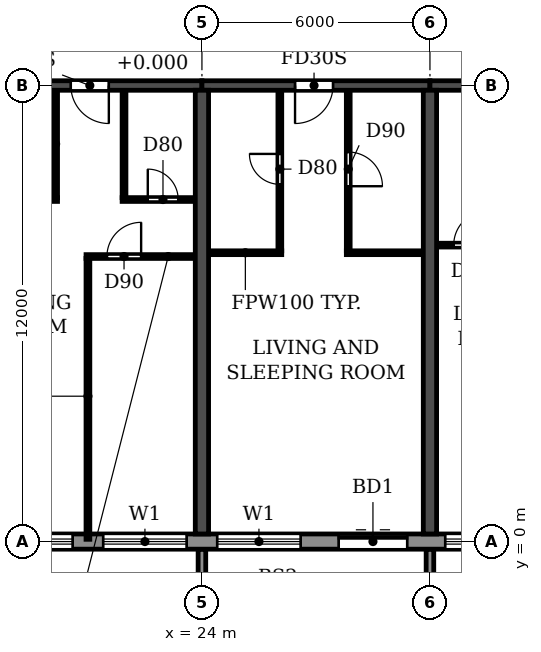
"""IFC4 building model, lengths in metres.
Left out: names, types, materials, properties, quantities, classifications, styles, units other than length and angle.
Written with IfcOpenShell. Run it as: python <this file> out.ifc"""

import sys

from ifc_helpers import new_model, si_unit, direction, frame, frame_2d, origin, place, context, subcontext, project, spatial, polyline, rectangle, outline, extrude, source, transform, mapped, element, fill, save


model = new_model("IFC4")
c1 = context("Model", 3, precision=1e-05, world=origin(), true_north=direction((0.0, 1.0)))
c2 = subcontext(c1, "Body", "Model", "MODEL_VIEW")
j1 = project(units=[si_unit("LENGTHUNIT", "METRE"), si_unit("PLANEANGLEUNIT", "RADIAN")], contexts=[c1])
p1 = place(None, origin())
s1 = spatial("IfcSite", under=j1, at=p1, CompositionType="ELEMENT")
p2 = place(p1, origin())
s2 = spatial("IfcBuilding", under=s1, at=p2, CompositionType="ELEMENT")
p3 = place(p2, frame((0.0, 0.0, 109.2)))
s3 = spatial("IfcBuildingStorey", under=s2, at=p3, CompositionType="ELEMENT", Elevation=109.2)
for number, where, z_axis, x_axis in (
    (1, (24.0, 0.2, 0.0), (0.0, 0.0, 1.0), (0.0, 1.0, 0.0)),
    (2, (30.0, 0.2, 0.0), (0.0, 0.0, 1.0), (0.0, 1.0, 0.0)),
):
    element("IfcWall", number, at=place(p3, frame(where, z_axis=z_axis, x_axis=x_axis)), inside=s3, PredefinedType="SHEAR", context=c2, shape_type="SweptSolid", body=[
        extrude(rectangle(XDim=11.675, YDim=0.35, at=frame_2d((5.837, 0.0))), origin(), (0.0, 0.0, 1.0), 3.06),
    ])
p4 = place(p3, frame((18.0, 12.0, 0.0), z_axis=(0.0, 0.0, 1.0), x_axis=(1.0, 0.0, 0.0)))
e3 = element("IfcWall", 3, at=p4, inside=s3, PredefinedType="SHEAR", context=c2, shape_type="SweptSolid", body=[
    extrude(rectangle(XDim=6.0, YDim=0.25, at=frame_2d((3.0, 0.0))), origin(), (0.0, 0.0, 1.0), 2.46),
])
p5 = place(p4, frame((2.55, 0.0, 0.0)))
e4 = element("IfcOpeningElement", 4, at=p5, cuts=e3, PredefinedType="OPENING", context=c2, shape_type="SweptSolid", body=[
    extrude(rectangle(XDim=1.0, YDim=2.1, at=frame_2d((0.5, 1.05))), frame((0.0, 0.135, 0.0), z_axis=(0.0, -1.0, 0.0), x_axis=(1.0, 0.0, 0.0)), (0.0, 0.0, 1.0), 0.27),
])
p6 = place(p3, frame((24.0, 12.0, 0.0), z_axis=(0.0, 0.0, 1.0), x_axis=(1.0, 0.0, 0.0)))
e5 = element("IfcWall", 5, at=p6, inside=s3, PredefinedType="SHEAR", context=c2, shape_type="SweptSolid", body=[
    extrude(rectangle(XDim=6.0, YDim=0.25, at=frame_2d((3.0, 0.0))), origin(), (0.0, 0.0, 1.0), 2.46),
])
p7 = place(p6, frame((2.45, 0.0, 0.0)))
e6 = element("IfcOpeningElement", 6, at=p7, cuts=e5, PredefinedType="OPENING", context=c2, shape_type="SweptSolid", body=[
    extrude(rectangle(XDim=1.0, YDim=2.1, at=frame_2d((0.5, 1.05))), frame((0.0, 0.135, 0.0), z_axis=(0.0, -1.0, 0.0), x_axis=(1.0, 0.0, 0.0)), (0.0, 0.0, 1.0), 0.27),
])
p8 = place(p3, frame((30.0, 12.0, 0.0), z_axis=(0.0, 0.0, 1.0), x_axis=(1.0, 0.0, 0.0)))
e7 = element("IfcWall", 7, at=p8, inside=s3, PredefinedType="SHEAR", context=c2, shape_type="SweptSolid", body=[
    extrude(rectangle(XDim=6.0, YDim=0.25, at=frame_2d((3.0, 0.0))), origin(), (0.0, 0.0, 1.0), 2.46),
])
p9 = place(p8, frame((2.55, 0.0, 0.0)))
e8 = element("IfcOpeningElement", 8, at=p9, cuts=e7, PredefinedType="OPENING", context=c2, shape_type="SweptSolid", body=[
    extrude(rectangle(XDim=1.0, YDim=2.1, at=frame_2d((0.5, 1.05))), frame((0.0, 0.135, 0.0), z_axis=(0.0, -1.0, 0.0), x_axis=(1.0, 0.0, 0.0)), (0.0, 0.0, 1.0), 0.27),
])
p10 = place(p3, frame((16.683, 0.0, 0.0), z_axis=(0.0, 0.0, 1.0), x_axis=(1.0, 0.0, 0.0)))
e9 = element("IfcWall", 9, at=p10, inside=s3, PredefinedType="STANDARD", context=c2, shape_type="SweptSolid", body=[
    extrude(rectangle(XDim=68.634, YDim=0.4, at=frame_2d((34.317, 0.0))), origin(), (0.0, 0.0, 1.0), 3.06),
])
p11 = place(p10, frame((1.717, 0.0, 0.9)))
e10 = element("IfcOpeningElement", 10, at=p11, cuts=e9, PredefinedType="OPENING", context=c2, shape_type="SweptSolid", body=[
    extrude(rectangle(XDim=2.2, YDim=1.5, at=frame_2d((1.1, 0.75))), frame((0.0, 0.21, 0.0), z_axis=(0.0, -1.0, 0.0), x_axis=(1.0, 0.0, 0.0)), (0.0, 0.0, 1.0), 0.42),
])
p12 = place(p10, frame((4.717, 0.0, 0.9)))
e11 = element("IfcOpeningElement", 11, at=p12, cuts=e9, PredefinedType="OPENING", context=c2, shape_type="SweptSolid", body=[
    extrude(rectangle(XDim=2.2, YDim=1.5, at=frame_2d((1.1, 0.75))), frame((0.0, 0.21, 0.0), z_axis=(0.0, -1.0, 0.0), x_axis=(1.0, 0.0, 0.0)), (0.0, 0.0, 1.0), 0.42),
])
p13 = place(p10, frame((7.717, 0.0, 0.9)))
e12 = element("IfcOpeningElement", 12, at=p13, cuts=e9, PredefinedType="OPENING", context=c2, shape_type="SweptSolid", body=[
    extrude(rectangle(XDim=2.2, YDim=1.5, at=frame_2d((1.1, 0.75))), frame((0.0, 0.21, 0.0), z_axis=(0.0, -1.0, 0.0), x_axis=(1.0, 0.0, 0.0)), (0.0, 0.0, 1.0), 0.42),
])
p14 = place(p10, frame((10.917, 0.0, 0.0)))
e13 = element("IfcOpeningElement", 13, at=p14, cuts=e9, PredefinedType="OPENING", context=c2, shape_type="SweptSolid", body=[
    extrude(rectangle(XDim=1.8, YDim=2.4, at=frame_2d((0.9, 1.2))), frame((0.0, 0.21, 0.0), z_axis=(0.0, -1.0, 0.0), x_axis=(1.0, 0.0, 0.0)), (0.0, 0.0, 1.0), 0.42),
])
p15 = place(p10, frame((13.717, 0.0, 0.9)))
e14 = element("IfcOpeningElement", 14, at=p15, cuts=e9, PredefinedType="OPENING", context=c2, shape_type="SweptSolid", body=[
    extrude(rectangle(XDim=2.2, YDim=1.5, at=frame_2d((1.1, 0.75))), frame((0.0, 0.21, 0.0), z_axis=(0.0, -1.0, 0.0), x_axis=(1.0, 0.0, 0.0)), (0.0, 0.0, 1.0), 0.42),
])
p16 = place(p10, frame((16.717, 0.0, 0.9)))
e15 = element("IfcOpeningElement", 15, at=p16, cuts=e9, PredefinedType="OPENING", context=c2, shape_type="SweptSolid", body=[
    extrude(rectangle(XDim=2.2, YDim=1.5, at=frame_2d((1.1, 0.75))), frame((0.0, 0.21, 0.0), z_axis=(0.0, -1.0, 0.0), x_axis=(1.0, 0.0, 0.0)), (0.0, 0.0, 1.0), 0.42),
])
p17 = place(p10, frame((19.717, 0.0, 0.9)))
e16 = element("IfcOpeningElement", 16, at=p17, cuts=e9, PredefinedType="OPENING", context=c2, shape_type="SweptSolid", body=[
    extrude(rectangle(XDim=2.2, YDim=1.5, at=frame_2d((1.1, 0.75))), frame((0.0, 0.21, 0.0), z_axis=(0.0, -1.0, 0.0), x_axis=(1.0, 0.0, 0.0)), (0.0, 0.0, 1.0), 0.42),
])
p18 = place(p10, frame((22.717, 0.0, 0.9)))
e17 = element("IfcOpeningElement", 17, at=p18, cuts=e9, PredefinedType="OPENING", context=c2, shape_type="SweptSolid", body=[
    extrude(rectangle(XDim=2.2, YDim=1.5, at=frame_2d((1.1, 0.75))), frame((0.0, 0.21, 0.0), z_axis=(0.0, -1.0, 0.0), x_axis=(1.0, 0.0, 0.0)), (0.0, 0.0, 1.0), 0.42),
])
p19 = place(p10, frame((25.717, 0.0, 0.9)))
e18 = element("IfcOpeningElement", 18, at=p19, cuts=e9, PredefinedType="OPENING", context=c2, shape_type="SweptSolid", body=[
    extrude(rectangle(XDim=2.2, YDim=1.5, at=frame_2d((1.1, 0.75))), frame((0.0, 0.21, 0.0), z_axis=(0.0, -1.0, 0.0), x_axis=(1.0, 0.0, 0.0)), (0.0, 0.0, 1.0), 0.42),
])
p20 = place(p10, frame((28.717, 0.0, 0.9)))
e19 = element("IfcOpeningElement", 19, at=p20, cuts=e9, PredefinedType="OPENING", context=c2, shape_type="SweptSolid", body=[
    extrude(rectangle(XDim=2.2, YDim=1.5, at=frame_2d((1.1, 0.75))), frame((0.0, 0.21, 0.0), z_axis=(0.0, -1.0, 0.0), x_axis=(1.0, 0.0, 0.0)), (0.0, 0.0, 1.0), 0.42),
])
p21 = place(p10, frame((31.917, 0.0, 0.0)))
e20 = element("IfcOpeningElement", 20, at=p21, cuts=e9, PredefinedType="OPENING", context=c2, shape_type="SweptSolid", body=[
    extrude(rectangle(XDim=1.8, YDim=2.4, at=frame_2d((0.9, 1.2))), frame((0.0, 0.21, 0.0), z_axis=(0.0, -1.0, 0.0), x_axis=(1.0, 0.0, 0.0)), (0.0, 0.0, 1.0), 0.42),
])
p22 = place(p10, frame((34.717, 0.0, 0.9)))
e21 = element("IfcOpeningElement", 21, at=p22, cuts=e9, PredefinedType="OPENING", context=c2, shape_type="SweptSolid", body=[
    extrude(rectangle(XDim=2.2, YDim=1.5, at=frame_2d((1.1, 0.75))), frame((0.0, 0.21, 0.0), z_axis=(0.0, -1.0, 0.0), x_axis=(1.0, 0.0, 0.0)), (0.0, 0.0, 1.0), 0.42),
])
p23 = place(p10, frame((37.717, 0.0, 0.9)))
e22 = element("IfcOpeningElement", 22, at=p23, cuts=e9, PredefinedType="OPENING", context=c2, shape_type="SweptSolid", body=[
    extrude(rectangle(XDim=2.2, YDim=1.5, at=frame_2d((1.1, 0.75))), frame((0.0, 0.21, 0.0), z_axis=(0.0, -1.0, 0.0), x_axis=(1.0, 0.0, 0.0)), (0.0, 0.0, 1.0), 0.42),
])
p24 = place(p10, frame((40.717, 0.0, 0.9)))
e23 = element("IfcOpeningElement", 23, at=p24, cuts=e9, PredefinedType="OPENING", context=c2, shape_type="SweptSolid", body=[
    extrude(rectangle(XDim=2.2, YDim=1.5, at=frame_2d((1.1, 0.75))), frame((0.0, 0.21, 0.0), z_axis=(0.0, -1.0, 0.0), x_axis=(1.0, 0.0, 0.0)), (0.0, 0.0, 1.0), 0.42),
])
p25 = place(p10, frame((43.717, 0.0, 0.9)))
e24 = element("IfcOpeningElement", 24, at=p25, cuts=e9, PredefinedType="OPENING", context=c2, shape_type="SweptSolid", body=[
    extrude(rectangle(XDim=2.2, YDim=1.5, at=frame_2d((1.1, 0.75))), frame((0.0, 0.21, 0.0), z_axis=(0.0, -1.0, 0.0), x_axis=(1.0, 0.0, 0.0)), (0.0, 0.0, 1.0), 0.42),
])
p26 = place(p10, frame((46.917, 0.0, 0.0)))
e25 = element("IfcOpeningElement", 25, at=p26, cuts=e9, PredefinedType="OPENING", context=c2, shape_type="SweptSolid", body=[
    extrude(rectangle(XDim=1.8, YDim=2.4, at=frame_2d((0.9, 1.2))), frame((0.0, 0.21, 0.0), z_axis=(0.0, -1.0, 0.0), x_axis=(1.0, 0.0, 0.0)), (0.0, 0.0, 1.0), 0.42),
])
p27 = place(p10, frame((49.717, 0.0, 0.9)))
e26 = element("IfcOpeningElement", 26, at=p27, cuts=e9, PredefinedType="OPENING", context=c2, shape_type="SweptSolid", body=[
    extrude(rectangle(XDim=2.2, YDim=1.5, at=frame_2d((1.1, 0.75))), frame((0.0, 0.21, 0.0), z_axis=(0.0, -1.0, 0.0), x_axis=(1.0, 0.0, 0.0)), (0.0, 0.0, 1.0), 0.42),
])
p28 = place(p10, frame((52.717, 0.0, 0.9)))
e27 = element("IfcOpeningElement", 27, at=p28, cuts=e9, PredefinedType="OPENING", context=c2, shape_type="SweptSolid", body=[
    extrude(rectangle(XDim=2.2, YDim=1.5, at=frame_2d((1.1, 0.75))), frame((0.0, 0.21, 0.0), z_axis=(0.0, -1.0, 0.0), x_axis=(1.0, 0.0, 0.0)), (0.0, 0.0, 1.0), 0.42),
])
p29 = place(p10, frame((55.717, 0.0, 0.9)))
e28 = element("IfcOpeningElement", 28, at=p29, cuts=e9, PredefinedType="OPENING", context=c2, shape_type="SweptSolid", body=[
    extrude(rectangle(XDim=2.2, YDim=1.5, at=frame_2d((1.1, 0.75))), frame((0.0, 0.21, 0.0), z_axis=(0.0, -1.0, 0.0), x_axis=(1.0, 0.0, 0.0)), (0.0, 0.0, 1.0), 0.42),
])
p30 = place(p10, frame((58.717, 0.0, 0.9)))
e29 = element("IfcOpeningElement", 29, at=p30, cuts=e9, PredefinedType="OPENING", context=c2, shape_type="SweptSolid", body=[
    extrude(rectangle(XDim=2.2, YDim=1.5, at=frame_2d((1.1, 0.75))), frame((0.0, 0.21, 0.0), z_axis=(0.0, -1.0, 0.0), x_axis=(1.0, 0.0, 0.0)), (0.0, 0.0, 1.0), 0.42),
])
p31 = place(p10, frame((61.717, 0.0, 0.9)))
e30 = element("IfcOpeningElement", 30, at=p31, cuts=e9, PredefinedType="OPENING", context=c2, shape_type="SweptSolid", body=[
    extrude(rectangle(XDim=2.2, YDim=1.5, at=frame_2d((1.1, 0.75))), frame((0.0, 0.21, 0.0), z_axis=(0.0, -1.0, 0.0), x_axis=(1.0, 0.0, 0.0)), (0.0, 0.0, 1.0), 0.42),
])
p32 = place(p10, frame((64.717, 0.0, 0.9)))
e31 = element("IfcOpeningElement", 31, at=p32, cuts=e9, PredefinedType="OPENING", context=c2, shape_type="SweptSolid", body=[
    extrude(rectangle(XDim=2.2, YDim=1.5, at=frame_2d((1.1, 0.75))), frame((0.0, 0.21, 0.0), z_axis=(0.0, -1.0, 0.0), x_axis=(1.0, 0.0, 0.0)), (0.0, 0.0, 1.0), 0.42),
])
m1 = source(origin(), c2, "Body", "SweptSolid", [
    extrude(outline(polyline([(0.0, 0.0), (0.2, 0.0), (0.2, 1.65), (0.0, 1.65), (0.0, 0.0)])), origin(), (0.0, 0.0, 1.0), 3.1),
])
for number, where in (
    (32, (23.9, -1.85, 0.0)),
    (33, (29.9, -1.85, 0.0)),
):
    element("IfcWall", number, at=place(p3, frame(where)), inside=s3, PredefinedType="STANDARD", context=c2, shape_type="MappedRepresentation", body=[
        mapped(m1, transform((0.0, 0.0, 0.0))),
    ])
p33 = place(p3, frame((20.95, 7.5, 0.0), z_axis=(0.0, 0.0, 1.0), x_axis=(1.0, 0.0, 0.0)))
e34 = element("IfcWall", 34, at=p33, inside=s3, PredefinedType="PARTITIONING", context=c2, shape_type="SweptSolid", body=[
    extrude(rectangle(XDim=2.865, YDim=0.1, at=frame_2d((1.433, 0.0))), origin(), (0.0, 0.0, 1.0), 3.06),
])
p34 = place(p33, frame((0.55, 0.0, 0.0)))
e35 = element("IfcOpeningElement", 35, at=p34, cuts=e34, PredefinedType="OPENING", context=c2, shape_type="SweptSolid", body=[
    extrude(rectangle(XDim=0.9, YDim=2.1, at=frame_2d((0.45, 1.05))), frame((0.0, 0.06, 0.0), z_axis=(0.0, -1.0, 0.0), x_axis=(1.0, 0.0, 0.0)), (0.0, 0.0, 1.0), 0.12),
])
p35 = place(p3, frame((24.185, 7.6, 0.0), z_axis=(0.0, 0.0, 1.0), x_axis=(1.0, 0.0, 0.0)))
e36 = element("IfcWall", 36, at=p35, inside=s3, PredefinedType="PARTITIONING", context=c2, shape_type="SweptSolid", body=[
    extrude(rectangle(XDim=1.915, YDim=0.1, at=frame_2d((0.958, 0.0))), origin(), (0.0, 0.0, 1.0), 3.06),
])
p36 = place(p3, frame((27.8, 7.6, 0.0), z_axis=(0.0, 0.0, 1.0), x_axis=(1.0, 0.0, 0.0)))
e37 = element("IfcWall", 37, at=p36, inside=s3, PredefinedType="PARTITIONING", context=c2, shape_type="SweptSolid", body=[
    extrude(rectangle(XDim=2.015, YDim=0.1, at=frame_2d((1.007, 0.0))), origin(), (0.0, 0.0, 1.0), 3.06),
])
p37 = place(p3, frame((30.185, 7.8, 0.0), z_axis=(0.0, 0.0, 1.0), x_axis=(1.0, 0.0, 0.0)))
e38 = element("IfcWall", 38, at=p37, inside=s3, PredefinedType="PARTITIONING", context=c2, shape_type="SweptSolid", body=[
    extrude(rectangle(XDim=2.015, YDim=0.1, at=frame_2d((1.007, 0.0))), origin(), (0.0, 0.0, 1.0), 3.06),
])
p38 = place(p37, frame((0.44, 0.0, 0.0)))
e39 = element("IfcOpeningElement", 39, at=p38, cuts=e38, PredefinedType="OPENING", context=c2, shape_type="SweptSolid", body=[
    extrude(rectangle(XDim=0.9, YDim=2.1, at=frame_2d((0.45, 1.05))), frame((0.0, 0.06, 0.0), z_axis=(0.0, -1.0, 0.0), x_axis=(1.0, 0.0, 0.0)), (0.0, 0.0, 1.0), 0.12),
])
p39 = place(p3, frame((18.185, 9.0, 0.0), z_axis=(0.0, 0.0, 1.0), x_axis=(1.0, 0.0, 0.0)))
e40 = element("IfcWall", 40, at=p39, inside=s3, PredefinedType="PARTITIONING", context=c2, shape_type="SweptSolid", body=[
    extrude(rectangle(XDim=2.015, YDim=0.1, at=frame_2d((1.007, 0.0))), origin(), (0.0, 0.0, 1.0), 3.06),
])
p40 = place(p39, frame((0.44, 0.0, 0.0)))
e41 = element("IfcOpeningElement", 41, at=p40, cuts=e40, PredefinedType="OPENING", context=c2, shape_type="SweptSolid", body=[
    extrude(rectangle(XDim=0.9, YDim=2.1, at=frame_2d((0.45, 1.05))), frame((0.0, 0.06, 0.0), z_axis=(0.0, -1.0, 0.0), x_axis=(1.0, 0.0, 0.0)), (0.0, 0.0, 1.0), 0.12),
])
p41 = place(p3, frame((21.9, 9.0, 0.0), z_axis=(0.0, 0.0, 1.0), x_axis=(1.0, 0.0, 0.0)))
e42 = element("IfcWall", 42, at=p41, inside=s3, PredefinedType="PARTITIONING", context=c2, shape_type="SweptSolid", body=[
    extrude(rectangle(XDim=1.915, YDim=0.1, at=frame_2d((0.958, 0.0))), origin(), (0.0, 0.0, 1.0), 3.06),
])
p42 = place(p41, frame((0.675, 0.0, 0.0)))
e43 = element("IfcOpeningElement", 43, at=p42, cuts=e42, PredefinedType="OPENING", context=c2, shape_type="SweptSolid", body=[
    extrude(rectangle(XDim=0.8, YDim=2.1, at=frame_2d((0.4, 1.05))), frame((0.0, 0.06, 0.0), z_axis=(0.0, -1.0, 0.0), x_axis=(1.0, 0.0, 0.0)), (0.0, 0.0, 1.0), 0.12),
])
p43 = place(p3, frame((20.15, 9.05, 0.0), z_axis=(0.0, 0.0, 1.0), x_axis=(0.0, 1.0, 0.0)))
e44 = element("IfcWall", 44, at=p43, inside=s3, PredefinedType="PARTITIONING", context=c2, shape_type="SweptSolid", body=[
    extrude(rectangle(XDim=2.815, YDim=0.1, at=frame_2d((1.407, 0.0))), origin(), (0.0, 0.0, 1.0), 3.06),
])
p44 = place(p3, frame((21.0, 0.06, 0.0), z_axis=(0.0, 0.0, 1.0), x_axis=(0.0, 1.0, 0.0)))
e45 = element("IfcWall", 45, at=p44, inside=s3, PredefinedType="PARTITIONING", context=c2, shape_type="SweptSolid", body=[
    extrude(rectangle(XDim=7.39, YDim=0.1, at=frame_2d((3.695, 0.0))), origin(), (0.0, 0.0, 1.0), 3.06),
])
p45 = place(p3, frame((21.95, 9.05, 0.0), z_axis=(0.0, 0.0, 1.0), x_axis=(0.0, 1.0, 0.0)))
e46 = element("IfcWall", 46, at=p45, inside=s3, PredefinedType="PARTITIONING", context=c2, shape_type="SweptSolid", body=[
    extrude(rectangle(XDim=2.815, YDim=0.1, at=frame_2d((1.407, 0.0))), origin(), (0.0, 0.0, 1.0), 3.06),
])
p46 = place(p3, frame((26.05, 7.65, 0.0), z_axis=(0.0, 0.0, 1.0), x_axis=(0.0, 1.0, 0.0)))
e47 = element("IfcWall", 47, at=p46, inside=s3, PredefinedType="PARTITIONING", context=c2, shape_type="SweptSolid", body=[
    extrude(rectangle(XDim=4.215, YDim=0.1, at=frame_2d((2.107, 0.0))), origin(), (0.0, 0.0, 1.0), 3.06),
])
p47 = place(p46, frame((1.75, 0.0, 0.0)))
e48 = element("IfcOpeningElement", 48, at=p47, cuts=e47, PredefinedType="OPENING", context=c2, shape_type="SweptSolid", body=[
    extrude(rectangle(XDim=0.8, YDim=2.1, at=frame_2d((0.4, 1.05))), frame((0.0, 0.06, 0.0), z_axis=(0.0, -1.0, 0.0), x_axis=(1.0, 0.0, 0.0)), (0.0, 0.0, 1.0), 0.12),
])
p48 = place(p3, frame((27.85, 7.65, 0.0), z_axis=(0.0, 0.0, 1.0), x_axis=(0.0, 1.0, 0.0)))
e49 = element("IfcWall", 49, at=p48, inside=s3, PredefinedType="PARTITIONING", context=c2, shape_type="SweptSolid", body=[
    extrude(rectangle(XDim=4.215, YDim=0.1, at=frame_2d((2.107, 0.0))), origin(), (0.0, 0.0, 1.0), 3.06),
])
p49 = place(p48, frame((1.7, 0.0, 0.0)))
e50 = element("IfcOpeningElement", 50, at=p49, cuts=e49, PredefinedType="OPENING", context=c2, shape_type="SweptSolid", body=[
    extrude(rectangle(XDim=0.9, YDim=2.1, at=frame_2d((0.45, 1.05))), frame((0.0, 0.06, 0.0), z_axis=(0.0, -1.0, 0.0), x_axis=(1.0, 0.0, 0.0)), (0.0, 0.0, 1.0), 0.12),
])
p50 = place(p11, origin())
e51 = element("IfcWindow", 51, at=p50, inside=s3, PartitioningType="DOUBLE_PANEL_HORIZONTAL", PredefinedType="WINDOW", context=c2, shape_type="SweptSolid", body=[
    extrude(rectangle(XDim=2.2, YDim=1.5, at=frame_2d((1.1, 0.75))), frame((0.0, 0.03, 0.0), z_axis=(0.0, -1.0, 0.0), x_axis=(1.0, 0.0, 0.0)), (0.0, 0.0, 1.0), 0.06),
])
fill(e10, e51)
p51 = place(p12, origin())
e52 = element("IfcWindow", 52, at=p51, inside=s3, PartitioningType="DOUBLE_PANEL_HORIZONTAL", PredefinedType="WINDOW", context=c2, shape_type="SweptSolid", body=[
    extrude(rectangle(XDim=2.2, YDim=1.5, at=frame_2d((1.1, 0.75))), frame((0.0, 0.03, 0.0), z_axis=(0.0, -1.0, 0.0), x_axis=(1.0, 0.0, 0.0)), (0.0, 0.0, 1.0), 0.06),
])
fill(e11, e52)
p52 = place(p13, origin())
e53 = element("IfcWindow", 53, at=p52, inside=s3, PartitioningType="DOUBLE_PANEL_HORIZONTAL", PredefinedType="WINDOW", context=c2, shape_type="SweptSolid", body=[
    extrude(rectangle(XDim=2.2, YDim=1.5, at=frame_2d((1.1, 0.75))), frame((0.0, 0.03, 0.0), z_axis=(0.0, -1.0, 0.0), x_axis=(1.0, 0.0, 0.0)), (0.0, 0.0, 1.0), 0.06),
])
fill(e12, e53)
p53 = place(p14, origin())
e54 = element("IfcDoor", 54, at=p53, inside=s3, OperationType="DOUBLE_DOOR_SLIDING", PredefinedType="DOOR", context=c2, shape_type="SweptSolid", body=[
    extrude(rectangle(XDim=1.8, YDim=2.4, at=frame_2d((0.9, 1.2))), frame((0.0, 0.025, 0.0), z_axis=(0.0, -1.0, 0.0), x_axis=(1.0, 0.0, 0.0)), (0.0, 0.0, 1.0), 0.05),
])
fill(e13, e54)
p54 = place(p15, origin())
e55 = element("IfcWindow", 55, at=p54, inside=s3, PartitioningType="DOUBLE_PANEL_HORIZONTAL", PredefinedType="WINDOW", context=c2, shape_type="SweptSolid", body=[
    extrude(rectangle(XDim=2.2, YDim=1.5, at=frame_2d((1.1, 0.75))), frame((0.0, 0.03, 0.0), z_axis=(0.0, -1.0, 0.0), x_axis=(1.0, 0.0, 0.0)), (0.0, 0.0, 1.0), 0.06),
])
fill(e14, e55)
p55 = place(p5, frame((1.0, 0.0, 0.0), z_axis=(0.0, 0.0, 1.0), x_axis=(-1.0, 0.0, 0.0)))
e56 = element("IfcDoor", 56, at=p55, inside=s3, OperationType="SINGLE_SWING_LEFT", PredefinedType="DOOR", context=c2, shape_type="SweptSolid", body=[
    extrude(rectangle(XDim=1.0, YDim=2.1, at=frame_2d((0.5, 1.05))), frame((0.0, 0.025, 0.0), z_axis=(0.0, -1.0, 0.0), x_axis=(1.0, 0.0, 0.0)), (0.0, 0.0, 1.0), 0.05),
])
fill(e4, e56)
p56 = place(p34, origin())
e57 = element("IfcDoor", 57, at=p56, inside=s3, OperationType="SINGLE_SWING_RIGHT", PredefinedType="DOOR", context=c2, shape_type="SweptSolid", body=[
    extrude(rectangle(XDim=0.9, YDim=2.1, at=frame_2d((0.45, 1.05))), frame((0.0, 0.025, 0.0), z_axis=(0.0, -1.0, 0.0), x_axis=(1.0, 0.0, 0.0)), (0.0, 0.0, 1.0), 0.05),
])
fill(e35, e57)
p57 = place(p42, origin())
e58 = element("IfcDoor", 58, at=p57, inside=s3, OperationType="SINGLE_SWING_LEFT", PredefinedType="DOOR", context=c2, shape_type="SweptSolid", body=[
    extrude(rectangle(XDim=0.8, YDim=2.1, at=frame_2d((0.4, 1.05))), frame((0.0, 0.025, 0.0), z_axis=(0.0, -1.0, 0.0), x_axis=(1.0, 0.0, 0.0)), (0.0, 0.0, 1.0), 0.05),
])
fill(e43, e58)
p58 = place(p47, origin())
e59 = element("IfcDoor", 59, at=p58, inside=s3, OperationType="SINGLE_SWING_RIGHT", PredefinedType="DOOR", context=c2, shape_type="SweptSolid", body=[
    extrude(rectangle(XDim=0.8, YDim=2.1, at=frame_2d((0.4, 1.05))), frame((0.0, 0.025, 0.0), z_axis=(0.0, -1.0, 0.0), x_axis=(1.0, 0.0, 0.0)), (0.0, 0.0, 1.0), 0.05),
])
fill(e48, e59)
p59 = place(p7, frame((1.0, 0.0, 0.0), z_axis=(0.0, 0.0, 1.0), x_axis=(-1.0, 0.0, 0.0)))
e60 = element("IfcDoor", 60, at=p59, inside=s3, OperationType="SINGLE_SWING_RIGHT", PredefinedType="DOOR", context=c2, shape_type="SweptSolid", body=[
    extrude(rectangle(XDim=1.0, YDim=2.1, at=frame_2d((0.5, 1.05))), frame((0.0, 0.025, 0.0), z_axis=(0.0, -1.0, 0.0), x_axis=(1.0, 0.0, 0.0)), (0.0, 0.0, 1.0), 0.05),
])
fill(e6, e60)
p60 = place(p49, frame((0.9, 0.0, 0.0), z_axis=(0.0, 0.0, 1.0), x_axis=(-1.0, 0.0, 0.0)))
e61 = element("IfcDoor", 61, at=p60, inside=s3, OperationType="SINGLE_SWING_RIGHT", PredefinedType="DOOR", context=c2, shape_type="SweptSolid", body=[
    extrude(rectangle(XDim=0.9, YDim=2.1, at=frame_2d((0.45, 1.05))), frame((0.0, 0.025, 0.0), z_axis=(0.0, -1.0, 0.0), x_axis=(1.0, 0.0, 0.0)), (0.0, 0.0, 1.0), 0.05),
])
fill(e50, e61)
p61 = place(p38, origin())
e62 = element("IfcDoor", 62, at=p61, inside=s3, OperationType="SINGLE_SWING_RIGHT", PredefinedType="DOOR", context=c2, shape_type="SweptSolid", body=[
    extrude(rectangle(XDim=0.9, YDim=2.1, at=frame_2d((0.45, 1.05))), frame((0.0, 0.025, 0.0), z_axis=(0.0, -1.0, 0.0), x_axis=(1.0, 0.0, 0.0)), (0.0, 0.0, 1.0), 0.05),
])
fill(e39, e62)
save(model, sys.argv[1])
